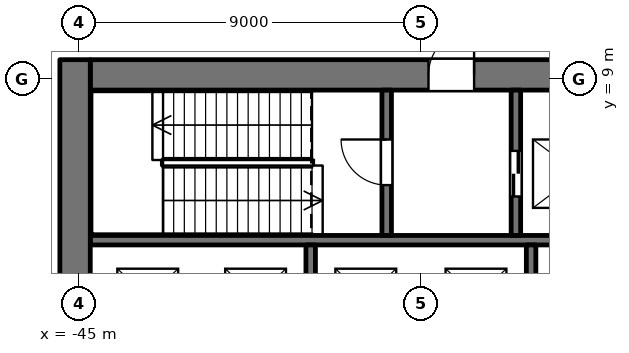
"""IFC4 building model, lengths in metres.
Left out: names, types, materials, properties, quantities, classifications, styles, units other than length and angle.
Written with IfcOpenShell. Run it as: python <this file> out.ifc"""

import sys

from ifc_helpers import new_model, si_unit, direction, frame, frame_2d, origin, place, context, subcontext, project, spatial, rectangle, extrude, element, fill, save


model = new_model("IFC4")
c1 = context("Model", 3, precision=1e-05, world=origin(), true_north=direction((0.0, 1.0)))
c2 = subcontext(c1, "Body", "Model", "MODEL_VIEW")
j1 = project(units=[si_unit("LENGTHUNIT", "METRE"), si_unit("PLANEANGLEUNIT", "RADIAN")], contexts=[c1])
p1 = place(None, origin())
s1 = spatial("IfcSite", under=j1, at=p1, CompositionType="ELEMENT")
p2 = place(p1, origin())
s2 = spatial("IfcBuilding", under=s1, at=p2, CompositionType="ELEMENT")
p3 = place(p2, frame((0.0, 0.0, 7.2)))
s3 = spatial("IfcBuildingStorey", under=s2, at=p3, CompositionType="ELEMENT", Elevation=7.2)
p4 = place(p3, frame((-44.7, 4.75, 0.0), z_axis=(0.0, 0.0, 1.0), x_axis=(1.0, 0.0, 0.0)))
e1 = element("IfcWall", 1, at=p4, inside=s3, PredefinedType="SHEAR", context=c2, shape_type="SweptSolid", body=[
    extrude(rectangle(XDim=17.4, YDim=0.25, at=frame_2d((8.7, 0.0))), origin(), (0.0, 0.0, 1.0), 5.1),
])
p5 = place(p3, frame((-44.7, 9.1, 0.0), z_axis=(0.0, 0.0, 1.0), x_axis=(1.0, 0.0, 0.0)))
e2 = element("IfcWall", 2, at=p5, inside=s3, PredefinedType="SHEAR", context=c2, shape_type="SweptSolid", body=[
    extrude(rectangle(XDim=17.4, YDim=0.8, at=frame_2d((8.7, 0.0))), origin(), (0.0, 0.0, 1.0), 5.1),
])
p6 = place(p5, frame((8.9, 0.0, 0.0)))
e3 = element("IfcOpeningElement", 3, at=p6, cuts=e2, PredefinedType="OPENING", context=c2, shape_type="SweptSolid", body=[
    extrude(rectangle(XDim=1.2, YDim=2.1, at=frame_2d((0.6, 1.05))), frame((0.0, 0.41, 0.0), z_axis=(0.0, -1.0, 0.0), x_axis=(1.0, 0.0, 0.0)), (0.0, 0.0, 1.0), 0.82),
])
p7 = place(p5, frame((14.85, 0.0, 0.0)))
e4 = element("IfcOpeningElement", 4, at=p7, cuts=e2, PredefinedType="OPENING", context=c2, shape_type="SweptSolid", body=[
    extrude(rectangle(XDim=0.9, YDim=2.1, at=frame_2d((0.45, 1.05))), frame((0.0, 0.41, 0.0), z_axis=(0.0, -1.0, 0.0), x_axis=(1.0, 0.0, 0.0)), (0.0, 0.0, 1.0), 0.82),
])
p8 = place(p5, frame((16.35, 0.0, 0.0)))
e5 = element("IfcOpeningElement", 5, at=p8, cuts=e2, PredefinedType="OPENING", context=c2, shape_type="SweptSolid", body=[
    extrude(rectangle(XDim=0.9, YDim=2.1, at=frame_2d((0.45, 1.05))), frame((0.0, 0.41, 0.0), z_axis=(0.0, -1.0, 0.0), x_axis=(1.0, 0.0, 0.0)), (0.0, 0.0, 1.0), 0.82),
])
p9 = place(p3, frame((-45.1, -9.5, 0.0), z_axis=(0.0, 0.0, 1.0), x_axis=(0.0, 1.0, 0.0)))
e6 = element("IfcWall", 6, at=p9, inside=s3, PredefinedType="SHEAR", context=c2, shape_type="SweptSolid", body=[
    extrude(rectangle(XDim=19.0, YDim=0.8, at=frame_2d((9.5, 0.0))), origin(), (0.0, 0.0, 1.0), 5.1),
])
p10 = place(p9, frame((8.3, 0.0, 0.0)))
e7 = element("IfcOpeningElement", 7, at=p10, cuts=e6, PredefinedType="OPENING", context=c2, shape_type="SweptSolid", body=[
    extrude(rectangle(XDim=2.4, YDim=2.1, at=frame_2d((1.2, 1.05))), frame((0.0, 0.41, 0.0), z_axis=(0.0, -1.0, 0.0), x_axis=(1.0, 0.0, 0.0)), (0.0, 0.0, 1.0), 0.82),
])
p11 = place(p3, frame((-38.9, 2.0, 0.0), z_axis=(0.0, 0.0, 1.0), x_axis=(0.0, 1.0, 0.0)))
e8 = element("IfcWall", 8, at=p11, inside=s3, PredefinedType="SHEAR", context=c2, shape_type="SweptSolid", body=[
    extrude(rectangle(XDim=2.625, YDim=0.25, at=frame_2d((1.312, 0.0))), origin(), (0.0, 0.0, 1.0), 5.1),
])
p12 = place(p3, frame((-36.9, 4.875, 0.0), z_axis=(0.0, 0.0, 1.0), x_axis=(0.0, 1.0, 0.0)))
e9 = element("IfcWall", 9, at=p12, inside=s3, PredefinedType="SHEAR", context=c2, shape_type="SweptSolid", body=[
    extrude(rectangle(XDim=3.825, YDim=0.25, at=frame_2d((1.913, 0.0))), origin(), (0.0, 0.0, 1.0), 5.1),
])
p13 = place(p12, frame((1.325, 0.0, 0.0)))
e10 = element("IfcOpeningElement", 10, at=p13, cuts=e9, PredefinedType="OPENING", context=c2, shape_type="SweptSolid", body=[
    extrude(rectangle(XDim=1.2, YDim=2.1, at=frame_2d((0.6, 1.05))), frame((0.0, 0.135, 0.0), z_axis=(0.0, -1.0, 0.0), x_axis=(1.0, 0.0, 0.0)), (0.0, 0.0, 1.0), 0.27),
])
p14 = place(p3, frame((-33.5, 4.875, 0.0), z_axis=(0.0, 0.0, 1.0), x_axis=(0.0, 1.0, 0.0)))
e11 = element("IfcWall", 11, at=p14, inside=s3, PredefinedType="SHEAR", context=c2, shape_type="SweptSolid", body=[
    extrude(rectangle(XDim=3.825, YDim=0.25, at=frame_2d((1.913, 0.0))), origin(), (0.0, 0.0, 1.0), 5.1),
])
p15 = place(p14, frame((1.025, 0.0, 0.0)))
e12 = element("IfcOpeningElement", 12, at=p15, cuts=e11, PredefinedType="OPENING", context=c2, shape_type="SweptSolid", body=[
    extrude(rectangle(XDim=1.2, YDim=2.1, at=frame_2d((0.6, 1.05))), frame((0.0, 0.135, 0.0), z_axis=(0.0, -1.0, 0.0), x_axis=(1.0, 0.0, 0.0)), (0.0, 0.0, 1.0), 0.27),
])
p16 = place(p3, frame((-33.1, 2.0, 0.0), z_axis=(0.0, 0.0, 1.0), x_axis=(0.0, 1.0, 0.0)))
e13 = element("IfcWall", 13, at=p16, inside=s3, PredefinedType="SHEAR", context=c2, shape_type="SweptSolid", body=[
    extrude(rectangle(XDim=2.625, YDim=0.25, at=frame_2d((1.312, 0.0))), origin(), (0.0, 0.0, 1.0), 5.1),
])
p17 = place(p15, origin())
e14 = element("IfcDoor", 14, at=p17, inside=s3, OperationType="SLIDING_TO_LEFT", PredefinedType="DOOR", context=c2, shape_type="SweptSolid", body=[
    extrude(rectangle(XDim=1.2, YDim=2.1, at=frame_2d((0.6, 1.05))), frame((0.0, 0.025, 0.0), z_axis=(0.0, -1.0, 0.0), x_axis=(1.0, 0.0, 0.0)), (0.0, 0.0, 1.0), 0.05),
])
fill(e12, e14)
p18 = place(p13, origin())
e15 = element("IfcDoor", 15, at=p18, inside=s3, OperationType="SINGLE_SWING_RIGHT", PredefinedType="DOOR", context=c2, shape_type="SweptSolid", body=[
    extrude(rectangle(XDim=1.2, YDim=2.1, at=frame_2d((0.6, 1.05))), frame((0.0, 0.025, 0.0), z_axis=(0.0, -1.0, 0.0), x_axis=(1.0, 0.0, 0.0)), (0.0, 0.0, 1.0), 0.05),
])
fill(e10, e15)
p19 = place(p6, origin())
e16 = element("IfcDoor", 16, at=p19, inside=s3, OperationType="SINGLE_SWING_RIGHT", PredefinedType="DOOR", context=c2, shape_type="SweptSolid", body=[
    extrude(rectangle(XDim=1.2, YDim=2.1, at=frame_2d((0.6, 1.05))), frame((0.0, -0.225, 0.0), z_axis=(0.0, -1.0, 0.0), x_axis=(1.0, 0.0, 0.0)), (0.0, 0.0, 1.0), 0.05),
])
fill(e3, e16)
save(model, sys.argv[1])
